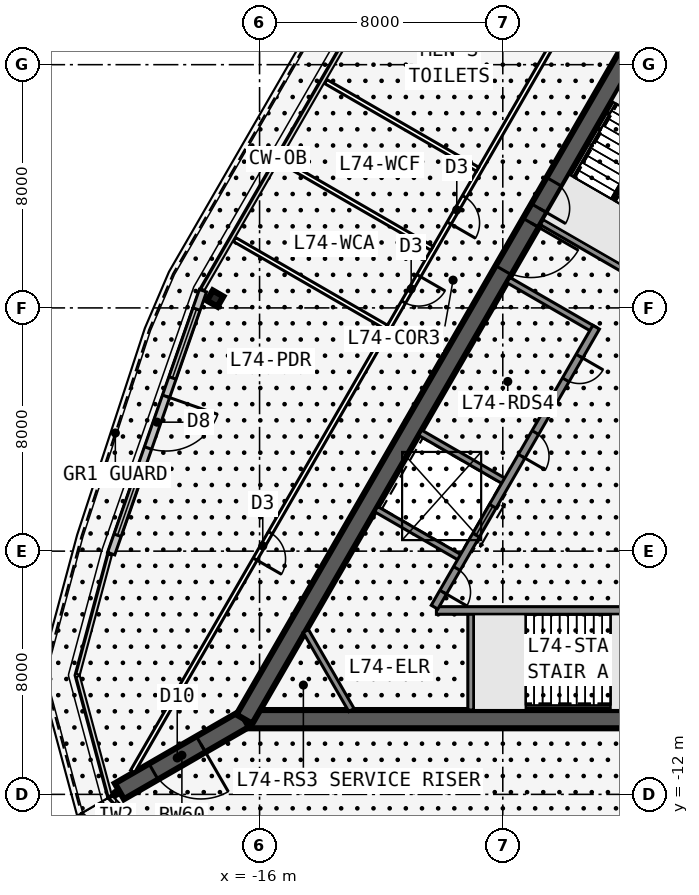
"""IFC4 building model, lengths in metres.
Left out: names, types, materials, properties, quantities, classifications, styles, units other than length and angle.
Written with IfcOpenShell. Run it as: python <this file> out.ifc"""

import sys

from ifc_helpers import new_model, si_unit, direction, frame, frame_2d, origin, origin_2d, place, context, subcontext, project, spatial, rectangle, i_section, extrude, element, fill, save


model = new_model("IFC4")
c1 = context("Model", 3, precision=1e-05, world=origin(), true_north=direction((0.0, 1.0)))
c2 = subcontext(c1, "Body", "Model", "MODEL_VIEW")
j1 = project(units=[si_unit("LENGTHUNIT", "METRE"), si_unit("PLANEANGLEUNIT", "RADIAN")], contexts=[c1])
p1 = place(None, origin())
s1 = spatial("IfcSite", under=j1, at=p1, CompositionType="ELEMENT")
p2 = place(p1, origin())
s2 = spatial("IfcBuilding", under=s1, at=p2, CompositionType="ELEMENT")
p3 = place(p2, frame((0.0, 0.0, 281.3)))
s3 = spatial("IfcBuildingStorey", under=s2, at=p3, CompositionType="ELEMENT", Elevation=281.3)
p4 = place(p3, frame((-16.5, -9.526, 0.0), z_axis=(0.0, 0.0, 1.0), x_axis=(1.0, 0.0, 0.0)))
e1 = element("IfcWall", 1, at=p4, inside=s3, PredefinedType="SHEAR", context=c2, shape_type="SweptSolid", body=[
    extrude(rectangle(XDim=33.0, YDim=0.6, at=frame_2d((16.5, 0.0))), origin(), (0.0, 0.0, 1.0), 5.5),
])
p5 = place(p4, frame((14.05, 0.0, 0.0)))
e2 = element("IfcOpeningElement", 2, at=p5, cuts=e1, PredefinedType="OPENING", context=c2, shape_type="SweptSolid", body=[
    extrude(rectangle(XDim=1.8, YDim=2.13, at=frame_2d((0.9, 1.065))), frame((0.0, 0.31, 0.0), z_axis=(0.0, -1.0, 0.0), x_axis=(1.0, 0.0, 0.0)), (0.0, 0.0, 1.0), 0.62),
])
p6 = place(p3, frame((-10.183, -5.951, 0.0), z_axis=(0.0, 0.0, 1.0), x_axis=(1.0, 0.0, 0.0)))
e3 = element("IfcWall", 3, at=p6, inside=s3, PredefinedType="SOLIDWALL", context=c2, shape_type="SweptSolid", body=[
    extrude(rectangle(XDim=7.633, YDim=0.25, at=frame_2d((3.816, 0.0))), origin(), (0.0, 0.0, 1.0), 5.25),
])
p7 = place(p3, frame((-9.05, -5.951, 0.0), z_axis=(0.0, 0.0, 1.0), x_axis=(0.0, -1.0, 0.0)))
e4 = element("IfcWall", 4, at=p7, inside=s3, PredefinedType="SOLIDWALL", context=c2, shape_type="SweptSolid", body=[
    extrude(rectangle(XDim=3.275, YDim=0.2, at=frame_2d((1.637, 0.0))), origin(), (0.0, 0.0, 1.0), 5.25),
])
p8 = place(p3, frame((0.0, 19.052, 0.0), z_axis=(0.0, 0.0, 1.0), x_axis=(-0.499999749417, -0.866025548458, 0.0)))
e5 = element("IfcWall", 5, at=p8, inside=s3, PredefinedType="SHEAR", context=c2, shape_type="SweptSolid", body=[
    extrude(rectangle(XDim=33.0, YDim=0.6, at=frame_2d((16.5, 0.0))), origin(), (0.0, 0.0, 1.0), 5.5),
])
p9 = place(p8, frame((14.15, 0.0, 0.0)))
e6 = element("IfcOpeningElement", 6, at=p9, cuts=e5, PredefinedType="OPENING", context=c2, shape_type="SweptSolid", body=[
    extrude(rectangle(XDim=1.8, YDim=2.13, at=frame_2d((0.9, 1.065))), frame((0.0, 0.31, 0.0), z_axis=(0.0, -1.0, 0.0), x_axis=(1.0, 0.0, 0.0)), (0.0, 0.0, 1.0), 0.62),
])
p10 = place(p8, frame((12.6, 0.0, 0.0)))
e7 = element("IfcOpeningElement", 7, at=p10, cuts=e5, PredefinedType="OPENING", context=c2, shape_type="SweptSolid", body=[
    extrude(rectangle(XDim=1.0, YDim=2.13, at=frame_2d((0.5, 1.065))), frame((0.0, 0.31, 0.0), z_axis=(0.0, -1.0, 0.0), x_axis=(1.0, 0.0, 0.0)), (0.0, 0.0, 1.0), 0.62),
])
p11 = place(p3, frame((-4.929, 3.365, 0.0), z_axis=(0.0, 0.0, 1.0), x_axis=(-0.499991433582, -0.866030349552, 0.0)))
e8 = element("IfcWall", 8, at=p11, inside=s3, PredefinedType="SOLIDWALL", context=c2, shape_type="SweptSolid", body=[
    extrude(rectangle(XDim=10.633, YDim=0.25, at=frame_2d((5.316, 0.0))), origin(), (0.0, 0.0, 1.0), 5.25),
])
p12 = place(p11, frame((9.164, 0.0, 0.0)))
e9 = element("IfcOpeningElement", 9, at=p12, cuts=e8, PredefinedType="OPENING", context=c2, shape_type="SweptSolid", body=[
    extrude(rectangle(XDim=0.9, YDim=2.13, at=frame_2d((0.45, 1.065))), frame((0.0, 0.135, 0.0), z_axis=(0.0, -1.0, 0.0), x_axis=(1.0, 0.0, 0.0)), (0.0, 0.0, 1.0), 0.27),
])
p13 = place(p11, frame((1.1, 0.0, 0.0)))
e10 = element("IfcOpeningElement", 10, at=p13, cuts=e8, PredefinedType="OPENING", context=c2, shape_type="SweptSolid", body=[
    extrude(rectangle(XDim=0.9, YDim=2.13, at=frame_2d((0.45, 1.065))), frame((0.0, 0.135, 0.0), z_axis=(0.0, -1.0, 0.0), x_axis=(1.0, 0.0, 0.0)), (0.0, 0.0, 1.0), 0.27),
])
p14 = place(p11, frame((4.0, 0.0, 0.0)))
e11 = element("IfcOpeningElement", 11, at=p14, cuts=e8, PredefinedType="OPENING", context=c2, shape_type="SweptSolid", body=[
    extrude(rectangle(XDim=0.9, YDim=2.13, at=frame_2d((0.45, 1.065))), frame((0.0, 0.135, 0.0), z_axis=(0.0, -1.0, 0.0), x_axis=(1.0, 0.0, 0.0)), (0.0, 0.0, 1.0), 0.27),
])
p15 = place(p11, frame((6.8, 0.0, 0.0)))
e12 = element("IfcOpeningElement", 12, at=p15, cuts=e8, PredefinedType="OPENING", context=c2, shape_type="SweptSolid", body=[
    extrude(rectangle(XDim=1.1, YDim=2.13, at=frame_2d((0.55, 1.065))), frame((0.0, 0.135, 0.0), z_axis=(0.0, -1.0, 0.0), x_axis=(1.0, 0.0, 0.0)), (0.0, 0.0, 1.0), 0.27),
])
for number, where, z_axis, x_axis in (
    (13, (-3.879, 5.184, 0.0), (0.0, 0.0, 1.0), (-0.866, 0.5, 0.0)),
    (14, (-4.979, 3.279, 0.0), (0.0, 0.0, 1.0), (-0.866, 0.5, 0.0)),
    (15, (-7.879, -1.744, 0.0), (0.0, 0.0, 1.0), (-0.866, 0.5, 0.0)),
    (16, (-9.329, -4.256, 0.0), (0.0, 0.0, 1.0), (-0.866, 0.5, 0.0)),
):
    element("IfcWall", number, at=place(p3, frame(where, z_axis=z_axis, x_axis=x_axis)), inside=s3, PredefinedType="SOLIDWALL", context=c2, shape_type="SweptSolid", body=[
        extrude(rectangle(XDim=3.275, YDim=0.2, at=frame_2d((1.637, 0.0))), origin(), (0.0, 0.0, 1.0), 5.25),
    ])
p16 = place(p3, frame((-16.5, -9.526, 0.0), z_axis=(0.0, 0.0, 1.0), x_axis=(-0.866031398331, -0.499989616998, 0.0)))
e17 = element("IfcWall", 17, at=p16, inside=s3, PredefinedType="SHEAR", context=c2, shape_type="SweptSolid", body=[
    extrude(rectangle(XDim=4.746, YDim=0.6, at=frame_2d((2.373, 0.0))), origin(), (0.0, 0.0, 1.0), 5.5),
])
p17 = place(p16, frame((1.65, 0.0, 0.0)))
e18 = element("IfcOpeningElement", 18, at=p17, cuts=e17, PredefinedType="OPENING", context=c2, shape_type="SweptSolid", body=[
    extrude(rectangle(XDim=1.8, YDim=2.13, at=frame_2d((0.9, 1.065))), frame((0.0, 0.31, 0.0), z_axis=(0.0, -1.0, 0.0), x_axis=(1.0, 0.0, 0.0)), (0.0, 0.0, 1.0), 0.62),
])
p18 = place(p3, frame((-17.461, 4.308, 0.0), z_axis=(0.0, 0.0, 1.0), x_axis=(-0.866025403784, 0.5, 0.0)))
e19 = element("IfcColumn", 19, at=p18, inside=s3, PredefinedType="COLUMN", context=c2, shape_type="SweptSolid", body=[
    extrude(i_section(OverallWidth=0.399, OverallDepth=0.386, WebThickness=0.021, FlangeThickness=0.033, at=origin_2d()), origin(), (0.0, 0.0, 1.0), 5.5),
])
p19 = place(p3, frame((-17.863, 4.567, 0.0), z_axis=(0.0, 0.0, 1.0), x_axis=(-0.329571607371, -0.944130581866, 0.0)))
e20 = element("IfcWall", 20, at=p19, inside=s3, PredefinedType="STANDARD", context=c2, shape_type="SweptSolid", body=[
    extrude(rectangle(XDim=9.161, YDim=0.25, at=frame_2d((4.581, 0.0))), origin(), (0.0, 0.0, 1.0), 5.25),
])
p20 = place(p19, frame((3.68, 0.0, 0.0)))
e21 = element("IfcOpeningElement", 21, at=p20, cuts=e20, PredefinedType="OPENING", context=c2, shape_type="SweptSolid", body=[
    extrude(rectangle(XDim=1.8, YDim=2.4, at=frame_2d((0.9, 1.2))), frame((0.0, 0.135, 0.0), z_axis=(0.0, -1.0, 0.0), x_axis=(1.0, 0.0, 0.0)), (0.0, 0.0, 1.0), 0.27),
])
p21 = place(p19, frame((0.64, 0.0, 0.6)))
e22 = element("IfcOpeningElement", 22, at=p21, cuts=e20, PredefinedType="OPENING", context=c2, shape_type="SweptSolid", body=[
    extrude(rectangle(XDim=2.4, YDim=3.6, at=frame_2d((1.2, 1.8))), frame((0.0, 0.135, 0.0), z_axis=(0.0, -1.0, 0.0), x_axis=(1.0, 0.0, 0.0)), (0.0, 0.0, 1.0), 0.27),
])
p22 = place(p19, frame((6.121, 0.0, 0.6)))
e23 = element("IfcOpeningElement", 23, at=p22, cuts=e20, PredefinedType="OPENING", context=c2, shape_type="SweptSolid", body=[
    extrude(rectangle(XDim=2.4, YDim=3.6, at=frame_2d((1.2, 1.8))), frame((0.0, 0.135, 0.0), z_axis=(0.0, -1.0, 0.0), x_axis=(1.0, 0.0, 0.0)), (0.0, 0.0, 1.0), 0.27),
])
p23 = place(p3, frame((-0.35, 23.096, 0.0), z_axis=(0.0, 0.0, 1.0), x_axis=(-0.499998875317, -0.866026053119, 0.0)))
e24 = element("IfcWall", 24, at=p23, inside=s3, PredefinedType="PARTITIONING", context=c2, shape_type="SweptSolid", body=[
    extrude(rectangle(XDim=39.654, YDim=0.15, at=frame_2d((19.827, 0.0))), origin(), (0.0, 0.0, 1.0), 5.25),
])
p24 = place(p23, frame((8.063, 0.0, 0.0)))
e25 = element("IfcOpeningElement", 25, at=p24, cuts=e24, PredefinedType="OPENING", context=c2, shape_type="SweptSolid", body=[
    extrude(rectangle(XDim=1.0, YDim=2.13, at=frame_2d((0.5, 1.065))), frame((0.0, 0.085, 0.0), z_axis=(0.0, -1.0, 0.0), x_axis=(1.0, 0.0, 0.0)), (0.0, 0.0, 1.0), 0.17),
])
p25 = place(p23, frame((17.827, 0.0, 0.0)))
e26 = element("IfcOpeningElement", 26, at=p25, cuts=e24, PredefinedType="OPENING", context=c2, shape_type="SweptSolid", body=[
    extrude(rectangle(XDim=1.0, YDim=2.13, at=frame_2d((0.5, 1.065))), frame((0.0, 0.085, 0.0), z_axis=(0.0, -1.0, 0.0), x_axis=(1.0, 0.0, 0.0)), (0.0, 0.0, 1.0), 0.17),
])
p26 = place(p23, frame((20.827, 0.0, 0.0)))
e27 = element("IfcOpeningElement", 27, at=p26, cuts=e24, PredefinedType="OPENING", context=c2, shape_type="SweptSolid", body=[
    extrude(rectangle(XDim=1.0, YDim=2.13, at=frame_2d((0.5, 1.065))), frame((0.0, 0.085, 0.0), z_axis=(0.0, -1.0, 0.0), x_axis=(1.0, 0.0, 0.0)), (0.0, 0.0, 1.0), 0.17),
])
p27 = place(p23, frame((30.591, 0.0, 0.0)))
e28 = element("IfcOpeningElement", 28, at=p27, cuts=e24, PredefinedType="OPENING", context=c2, shape_type="SweptSolid", body=[
    extrude(rectangle(XDim=1.0, YDim=2.13, at=frame_2d((0.5, 1.065))), frame((0.0, 0.085, 0.0), z_axis=(0.0, -1.0, 0.0), x_axis=(1.0, 0.0, 0.0)), (0.0, 0.0, 1.0), 0.17),
])
p28 = place(p3, frame((-8.829, 8.561, 0.0), z_axis=(0.0, 0.0, 1.0), x_axis=(-0.866015751745, 0.50001671745, 0.0)))
e29 = element("IfcWall", 29, at=p28, inside=s3, PredefinedType="PARTITIONING", context=c2, shape_type="SweptSolid", body=[
    extrude(rectangle(XDim=5.769, YDim=0.15, at=frame_2d((2.885, 0.0))), origin(), (0.0, 0.0, 1.0), 5.25),
])
p29 = place(p3, frame((-10.329, 5.963, 0.0), z_axis=(0.0, 0.0, 1.0), x_axis=(-0.866015751745, 0.50001671745, 0.0)))
e30 = element("IfcWall", 30, at=p29, inside=s3, PredefinedType="PARTITIONING", context=c2, shape_type="SweptSolid", body=[
    extrude(rectangle(XDim=5.769, YDim=0.15, at=frame_2d((2.885, 0.0))), origin(), (0.0, 0.0, 1.0), 4.394),
])
p30 = place(p3, frame((-11.829, 3.365, 0.0), z_axis=(0.0, 0.0, 1.0), x_axis=(-0.866015751745, 0.50001671745, 0.0)))
e31 = element("IfcWall", 31, at=p30, inside=s3, PredefinedType="PARTITIONING", context=c2, shape_type="SweptSolid", body=[
    extrude(rectangle(XDim=5.769, YDim=0.15, at=frame_2d((2.885, 0.0))), origin(), (0.0, 0.0, 1.0), 5.25),
])
p31 = place(p3, frame((-20.61, -11.899, 0.0), z_axis=(0.0, 0.0, 1.0), x_axis=(-0.866065156741, -0.499931139538, 0.0)))
e32 = element("IfcWall", 32, at=p31, inside=s3, PredefinedType="PARTITIONING", context=c2, shape_type="SweptSolid", body=[
    extrude(rectangle(XDim=0.27, YDim=0.15, at=frame_2d((0.135, 0.0))), origin(), (0.0, 0.0, 1.0), 5.25),
])
p32 = place(p3, frame((-12.978, -9.226, 0.0), z_axis=(0.0, 0.0, 1.0), x_axis=(-0.499952404951, 0.866052881055, 0.0)))
e33 = element("IfcWall", 33, at=p32, inside=s3, PredefinedType="SOLIDWALL", context=c2, shape_type="SweptSolid", body=[
    extrude(rectangle(XDim=3.002, YDim=0.2, at=frame_2d((1.501, 0.0))), origin(), (0.0, 0.0, 1.0), 5.25),
])
p33 = place(p3, frame((-7.247, -7.576, 0.0), z_axis=(0.0, 0.0, 1.0), x_axis=(1.0, 0.0, 0.0)))
e34 = element("IfcWall", 34, at=p33, inside=s3, PredefinedType="SOLIDWALL", context=c2, shape_type="SweptSolid", body=[
    extrude(rectangle(XDim=2.794, YDim=0.1, at=frame_2d((1.397, 0.0))), origin(), (0.0, 0.0, 1.0), 5.5),
])
p34 = place(p3, frame((-2.988, 9.978, 0.0), z_axis=(0.0, 0.0, 1.0), x_axis=(-0.499992232847, -0.866029888106, 0.0)))
e35 = element("IfcWall", 35, at=p34, inside=s3, PredefinedType="SOLIDWALL", context=c2, shape_type="SweptSolid", body=[
    extrude(rectangle(XDim=2.794, YDim=0.1, at=frame_2d((1.397, 0.0))), origin(), (0.0, 0.0, 1.0), 5.5),
])
p35 = place(p20, origin())
e36 = element("IfcDoor", 36, at=p35, inside=s3, OperationType="DOUBLE_DOOR_SINGLE_SWING", PredefinedType="DOOR", context=c2, shape_type="SweptSolid", body=[
    extrude(rectangle(XDim=1.8, YDim=2.4, at=frame_2d((0.9, 1.2))), frame((0.0, 0.025, 0.0), z_axis=(0.0, -1.0, 0.0), x_axis=(1.0, 0.0, 0.0)), (0.0, 0.0, 1.0), 0.05),
])
fill(e21, e36)
p36 = place(p21, origin())
e37 = element("IfcWindow", 37, at=p36, inside=s3, PartitioningType="SINGLE_PANEL", PredefinedType="WINDOW", context=c2, shape_type="SweptSolid", body=[
    extrude(rectangle(XDim=2.4, YDim=3.6, at=frame_2d((1.2, 1.8))), frame((0.0, 0.03, 0.0), z_axis=(0.0, -1.0, 0.0), x_axis=(1.0, 0.0, 0.0)), (0.0, 0.0, 1.0), 0.06),
])
fill(e22, e37)
p37 = place(p22, origin())
e38 = element("IfcWindow", 38, at=p37, inside=s3, PartitioningType="SINGLE_PANEL", PredefinedType="WINDOW", context=c2, shape_type="SweptSolid", body=[
    extrude(rectangle(XDim=2.4, YDim=3.6, at=frame_2d((1.2, 1.8))), frame((0.0, 0.03, 0.0), z_axis=(0.0, -1.0, 0.0), x_axis=(1.0, 0.0, 0.0)), (0.0, 0.0, 1.0), 0.06),
])
fill(e23, e38)
p38 = place(p25, origin())
e39 = element("IfcDoor", 39, at=p38, inside=s3, OperationType="SINGLE_SWING_RIGHT", PredefinedType="DOOR", context=c2, shape_type="SweptSolid", body=[
    extrude(rectangle(XDim=1.0, YDim=2.13, at=frame_2d((0.5, 1.065))), frame((0.0, 0.025, 0.0), z_axis=(0.0, -1.0, 0.0), x_axis=(1.0, 0.0, 0.0)), (0.0, 0.0, 1.0), 0.05),
])
fill(e26, e39)
p39 = place(p26, origin())
e40 = element("IfcDoor", 40, at=p39, inside=s3, OperationType="SINGLE_SWING_LEFT", PredefinedType="DOOR", context=c2, shape_type="SweptSolid", body=[
    extrude(rectangle(XDim=1.0, YDim=2.13, at=frame_2d((0.5, 1.065))), frame((0.0, 0.025, 0.0), z_axis=(0.0, -1.0, 0.0), x_axis=(1.0, 0.0, 0.0)), (0.0, 0.0, 1.0), 0.05),
])
fill(e27, e40)
p40 = place(p27, origin())
e41 = element("IfcDoor", 41, at=p40, inside=s3, OperationType="SINGLE_SWING_RIGHT", PredefinedType="DOOR", context=c2, shape_type="SweptSolid", body=[
    extrude(rectangle(XDim=1.0, YDim=2.13, at=frame_2d((0.5, 1.065))), frame((0.0, 0.025, 0.0), z_axis=(0.0, -1.0, 0.0), x_axis=(1.0, 0.0, 0.0)), (0.0, 0.0, 1.0), 0.05),
])
fill(e28, e41)
p41 = place(p9, origin())
e42 = element("IfcDoor", 42, at=p41, inside=s3, OperationType="DOUBLE_DOOR_SINGLE_SWING", PredefinedType="DOOR", context=c2, shape_type="SweptSolid", body=[
    extrude(rectangle(XDim=1.8, YDim=2.13, at=frame_2d((0.9, 1.065))), frame((0.0, 0.025, 0.0), z_axis=(0.0, -1.0, 0.0), x_axis=(1.0, 0.0, 0.0)), (0.0, 0.0, 1.0), 0.05),
])
fill(e6, e42)
p42 = place(p10, origin())
e43 = element("IfcDoor", 43, at=p42, inside=s3, OperationType="SINGLE_SWING_RIGHT", PredefinedType="DOOR", context=c2, shape_type="SweptSolid", body=[
    extrude(rectangle(XDim=1.0, YDim=2.13, at=frame_2d((0.5, 1.065))), frame((0.0, 0.025, 0.0), z_axis=(0.0, -1.0, 0.0), x_axis=(1.0, 0.0, 0.0)), (0.0, 0.0, 1.0), 0.05),
])
fill(e7, e43)
p43 = place(p17, origin())
e44 = element("IfcDoor", 44, at=p43, inside=s3, OperationType="DOUBLE_DOOR_DOUBLE_SWING", PredefinedType="DOOR", context=c2, shape_type="SweptSolid", body=[
    extrude(rectangle(XDim=1.8, YDim=2.13, at=frame_2d((0.9, 1.065))), frame((0.0, 0.025, 0.0), z_axis=(0.0, -1.0, 0.0), x_axis=(1.0, 0.0, 0.0)), (0.0, 0.0, 1.0), 0.05),
])
fill(e18, e44)
p44 = place(p12, origin())
e45 = element("IfcDoor", 45, at=p44, inside=s3, OperationType="SINGLE_SWING_RIGHT", PredefinedType="DOOR", context=c2, shape_type="SweptSolid", body=[
    extrude(rectangle(XDim=0.9, YDim=2.13, at=frame_2d((0.45, 1.065))), frame((0.0, 0.025, 0.0), z_axis=(0.0, -1.0, 0.0), x_axis=(1.0, 0.0, 0.0)), (0.0, 0.0, 1.0), 0.05),
])
fill(e9, e45)
p45 = place(p13, origin())
e46 = element("IfcDoor", 46, at=p45, inside=s3, OperationType="SINGLE_SWING_LEFT", PredefinedType="DOOR", context=c2, shape_type="SweptSolid", body=[
    extrude(rectangle(XDim=0.9, YDim=2.13, at=frame_2d((0.45, 1.065))), frame((0.0, 0.025, 0.0), z_axis=(0.0, -1.0, 0.0), x_axis=(1.0, 0.0, 0.0)), (0.0, 0.0, 1.0), 0.05),
])
fill(e10, e46)
p46 = place(p14, origin())
e47 = element("IfcDoor", 47, at=p46, inside=s3, OperationType="SINGLE_SWING_RIGHT", PredefinedType="DOOR", context=c2, shape_type="SweptSolid", body=[
    extrude(rectangle(XDim=0.9, YDim=2.13, at=frame_2d((0.45, 1.065))), frame((0.0, 0.025, 0.0), z_axis=(0.0, -1.0, 0.0), x_axis=(1.0, 0.0, 0.0)), (0.0, 0.0, 1.0), 0.05),
])
fill(e11, e47)
p47 = place(p15, origin())
e48 = element("IfcDoor", 48, at=p47, inside=s3, OperationType="DOUBLE_DOOR_SLIDING", PredefinedType="USERDEFINED", context=c2, shape_type="SweptSolid", body=[
    extrude(rectangle(XDim=1.1, YDim=2.13, at=frame_2d((0.55, 1.065))), frame((0.0, 0.025, 0.0), z_axis=(0.0, -1.0, 0.0), x_axis=(1.0, 0.0, 0.0)), (0.0, 0.0, 1.0), 0.05),
])
fill(e12, e48)
save(model, sys.argv[1])
